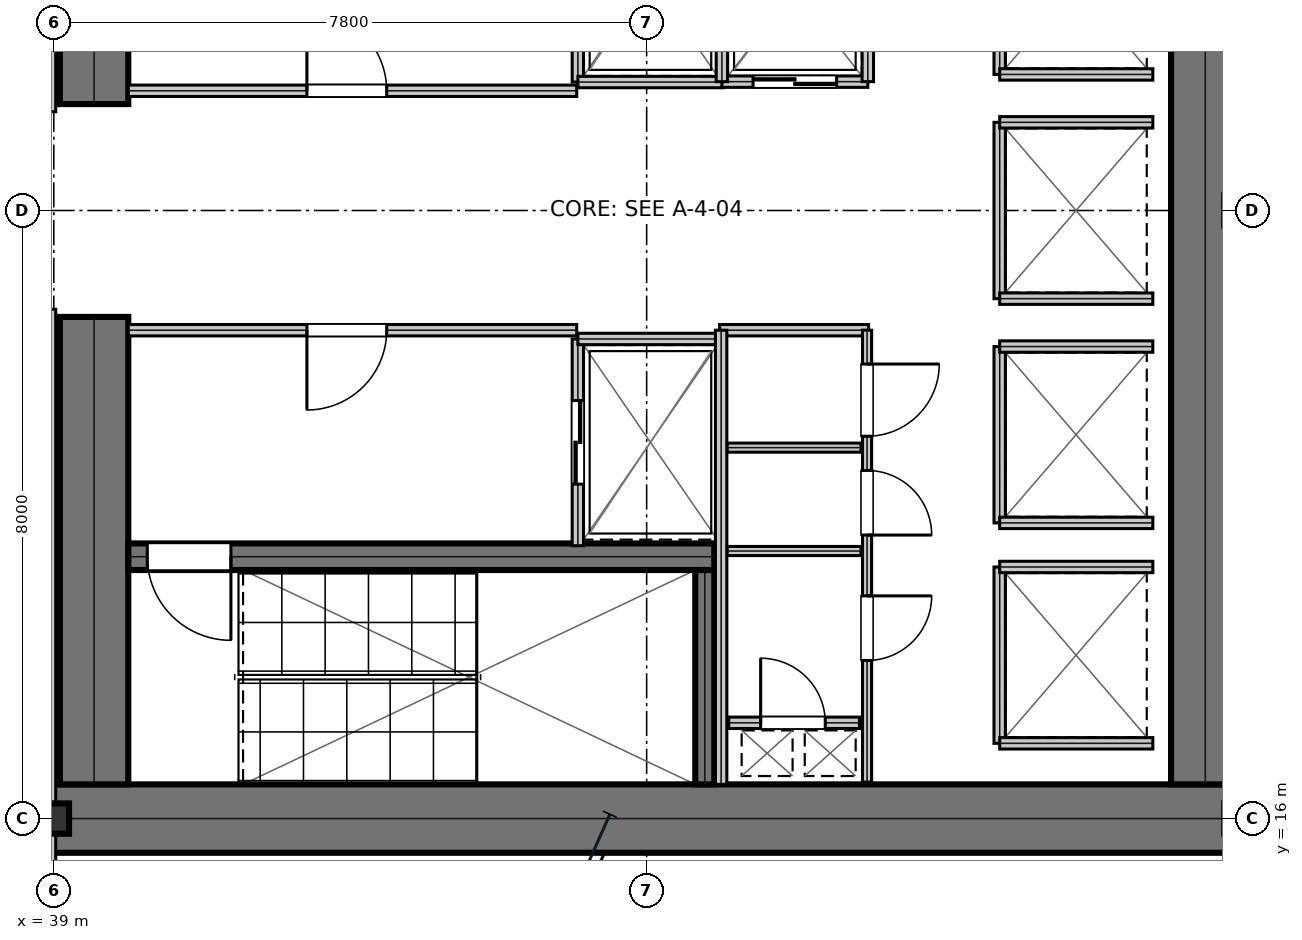
"""IFC4 building model, lengths in metres.
Left out: names, types, materials, properties, quantities, classifications, styles, units other than length and angle.
Written with IfcOpenShell. Run it as: python <this file> out.ifc"""

import sys

from ifc_helpers import new_model, si_unit, direction, frame, frame_2d, origin, origin_2d, place, context, subcontext, project, spatial, rectangle, i_section, extrude, element, fill, save


model = new_model("IFC4")
c1 = context("Model", 3, precision=1e-05, world=origin(), true_north=direction((0.0, 1.0)))
c2 = subcontext(c1, "Body", "Model", "MODEL_VIEW")
j1 = project(units=[si_unit("LENGTHUNIT", "METRE"), si_unit("PLANEANGLEUNIT", "RADIAN")], contexts=[c1])
p1 = place(None, origin())
s1 = spatial("IfcSite", under=j1, at=p1, CompositionType="ELEMENT")
p2 = place(p1, origin())
s2 = spatial("IfcBuilding", under=s1, at=p2, CompositionType="ELEMENT")
p3 = place(p2, frame((0.0, 0.0, 94.5)))
s3 = spatial("IfcBuildingStorey", under=s2, at=p3, CompositionType="ELEMENT", Elevation=94.5)
p4 = place(p3, frame((38.8, 16.0, 0.0), z_axis=(0.0, 0.0, 1.0), x_axis=(1.0, 0.0, 0.0)))
e1 = element("IfcWall", 1, at=p4, inside=s3, PredefinedType="SHEAR", context=c2, shape_type="SweptSolid", body=[
    extrude(rectangle(XDim=16.0, YDim=0.9, at=frame_2d((8.0, 0.0))), origin(), (0.0, 0.0, 1.0), 3.81),
])
for number, where, z_axis, x_axis in (
    (2, (39.53, 16.45, 0.0), (0.0, 0.0, 1.0), (0.0, 1.0, 0.0)),
    (3, (39.53, 25.4, 0.0), (0.0, 0.0, 1.0), (0.0, 1.0, 0.0)),
):
    element("IfcWall", number, at=place(p3, frame(where, z_axis=z_axis, x_axis=x_axis)), inside=s3, PredefinedType="SHEAR", context=c2, shape_type="SweptSolid", body=[
        extrude(rectangle(XDim=6.15, YDim=0.9, at=frame_2d((3.075, 0.0))), origin(), (0.0, 0.0, 1.0), 3.81),
    ])
p5 = place(p3, frame((54.15, 16.45, 0.0), z_axis=(0.0, 0.0, 1.0), x_axis=(0.0, 1.0, 0.0)))
e4 = element("IfcWall", 4, at=p5, inside=s3, PredefinedType="SHEAR", context=c2, shape_type="SweptSolid", body=[
    extrude(rectangle(XDim=15.1, YDim=0.9, at=frame_2d((7.55, 0.0))), origin(), (0.0, 0.0, 1.0), 3.81),
])
p6 = place(p3, frame((39.98, 19.445, 0.0), z_axis=(0.0, 0.0, 1.0), x_axis=(1.0, 0.0, 0.0)))
e5 = element("IfcWall", 5, at=p6, inside=s3, PredefinedType="SHEAR", context=c2, shape_type="SweptSolid", body=[
    extrude(rectangle(XDim=7.71, YDim=0.35, at=frame_2d((3.855, 0.0))), origin(), (0.0, 0.0, 1.0), 3.81),
])
p7 = place(p6, frame((0.25, 0.0, 0.0)))
e6 = element("IfcOpeningElement", 6, at=p7, cuts=e5, PredefinedType="OPENING", context=c2, shape_type="SweptSolid", body=[
    extrude(rectangle(XDim=1.1, YDim=2.15, at=frame_2d((0.55, 1.075))), frame((0.0, 0.185, 0.0), z_axis=(0.0, -1.0, 0.0), x_axis=(1.0, 0.0, 0.0)), (0.0, 0.0, 1.0), 0.37),
])
p8 = place(p3, frame((47.565, 16.45, 0.0), z_axis=(0.0, 0.0, 1.0), x_axis=(0.0, 1.0, 0.0)))
e7 = element("IfcWall", 7, at=p8, inside=s3, PredefinedType="SHEAR", context=c2, shape_type="SweptSolid", body=[
    extrude(rectangle(XDim=2.82, YDim=0.25, at=frame_2d((1.41, 0.0))), origin(), (0.0, 0.0, 1.0), 3.81),
])
p9 = place(p3, frame((39.0, 16.0, 0.0), z_axis=(0.0, 0.0, 1.0), x_axis=(1.0, 0.0, 0.0)))
e8 = element("IfcColumn", 8, at=p9, inside=s3, PredefinedType="COLUMN", context=c2, shape_type="SweptSolid", body=[
    extrude(i_section(OverallWidth=0.401, OverallDepth=0.399, WebThickness=0.025, FlangeThickness=0.04, at=origin_2d()), origin(), (0.0, 0.0, 1.0), 4.044),
])
p10 = place(p3, frame((39.98, 25.575, 0.0), z_axis=(0.0, 0.0, 1.0), x_axis=(1.0, 0.0, 0.0)))
e9 = element("IfcWall", 9, at=p10, inside=s3, PredefinedType="PARTITIONING", context=c2, shape_type="SweptSolid", body=[
    extrude(rectangle(XDim=5.9, YDim=0.15, at=frame_2d((2.95, 0.0))), origin(), (0.0, 0.0, 1.0), 3.81),
])
p11 = place(p10, frame((2.35, 0.0, 0.0)))
e10 = element("IfcOpeningElement", 10, at=p11, cuts=e9, PredefinedType="OPENING", context=c2, shape_type="SweptSolid", body=[
    extrude(rectangle(XDim=1.05, YDim=2.15, at=frame_2d((0.525, 1.075))), frame((0.0, 0.085, 0.0), z_axis=(0.0, -1.0, 0.0), x_axis=(1.0, 0.0, 0.0)), (0.0, 0.0, 1.0), 0.17),
])
p12 = place(p3, frame((39.98, 22.425, 0.0), z_axis=(0.0, 0.0, 1.0), x_axis=(1.0, 0.0, 0.0)))
e11 = element("IfcWall", 11, at=p12, inside=s3, PredefinedType="PARTITIONING", context=c2, shape_type="SweptSolid", body=[
    extrude(rectangle(XDim=5.9, YDim=0.15, at=frame_2d((2.95, 0.0))), origin(), (0.0, 0.0, 1.0), 3.81),
])
p13 = place(p12, frame((2.35, 0.0, 0.0)))
e12 = element("IfcOpeningElement", 12, at=p13, cuts=e11, PredefinedType="OPENING", context=c2, shape_type="SweptSolid", body=[
    extrude(rectangle(XDim=1.05, YDim=2.15, at=frame_2d((0.525, 1.075))), frame((0.0, 0.085, 0.0), z_axis=(0.0, -1.0, 0.0), x_axis=(1.0, 0.0, 0.0)), (0.0, 0.0, 1.0), 0.17),
])
p14 = place(p3, frame((45.895, 25.69, 0.0), z_axis=(0.0, 0.0, 1.0), x_axis=(0.0, 1.0, 0.0)))
e13 = element("IfcWall", 13, at=p14, inside=s3, PredefinedType="PARTITIONING", context=c2, shape_type="SweptSolid", body=[
    extrude(rectangle(XDim=2.72, YDim=0.15, at=frame_2d((1.36, 0.0))), origin(), (0.0, 0.0, 1.0), 3.81),
])
p15 = place(p14, frame((0.81, 0.0, 0.0)))
e14 = element("IfcOpeningElement", 14, at=p15, cuts=e13, PredefinedType="OPENING", context=c2, shape_type="SweptSolid", body=[
    extrude(rectangle(XDim=1.1, YDim=2.15, at=frame_2d((0.55, 1.075))), frame((0.0, 0.085, 0.0), z_axis=(0.0, -1.0, 0.0), x_axis=(1.0, 0.0, 0.0)), (0.0, 0.0, 1.0), 0.17),
])
p16 = place(p3, frame((45.895, 25.69, 0.0), z_axis=(0.0, 0.0, 1.0), x_axis=(1.0, 0.0, 0.0)))
e15 = element("IfcWall", 15, at=p16, inside=s3, PredefinedType="PARTITIONING", context=c2, shape_type="SweptSolid", body=[
    extrude(rectangle(XDim=1.915, YDim=0.15, at=frame_2d((0.958, 0.0))), origin(), (0.0, 0.0, 1.0), 3.81),
])
p17 = place(p3, frame((45.895, 19.59, 0.0), z_axis=(0.0, 0.0, 1.0), x_axis=(0.0, 1.0, 0.0)))
e16 = element("IfcWall", 16, at=p17, inside=s3, PredefinedType="PARTITIONING", context=c2, shape_type="SweptSolid", body=[
    extrude(rectangle(XDim=2.72, YDim=0.15, at=frame_2d((1.36, 0.0))), origin(), (0.0, 0.0, 1.0), 3.81),
])
p18 = place(p17, frame((0.81, 0.0, 0.0)))
e17 = element("IfcOpeningElement", 17, at=p18, cuts=e16, PredefinedType="OPENING", context=c2, shape_type="SweptSolid", body=[
    extrude(rectangle(XDim=1.1, YDim=2.15, at=frame_2d((0.55, 1.075))), frame((0.0, 0.085, 0.0), z_axis=(0.0, -1.0, 0.0), x_axis=(1.0, 0.0, 0.0)), (0.0, 0.0, 1.0), 0.17),
])
p19 = place(p3, frame((45.895, 22.31, 0.0), z_axis=(0.0, 0.0, 1.0), x_axis=(1.0, 0.0, 0.0)))
e18 = element("IfcWall", 18, at=p19, inside=s3, PredefinedType="PARTITIONING", context=c2, shape_type="SweptSolid", body=[
    extrude(rectangle(XDim=1.915, YDim=0.15, at=frame_2d((0.958, 0.0))), origin(), (0.0, 0.0, 1.0), 3.81),
])
p20 = place(p3, frame((47.79, 25.695, 0.0), z_axis=(0.0, 0.0, 1.0), x_axis=(1.0, 0.0, 0.0)))
e19 = element("IfcWall", 19, at=p20, inside=s3, PredefinedType="PARTITIONING", context=c2, shape_type="SweptSolid", body=[
    extrude(rectangle(XDim=1.92, YDim=0.15, at=frame_2d((0.96, 0.0))), origin(), (0.0, 0.0, 1.0), 3.81),
])
p21 = place(p20, frame((0.41, 0.0, 0.0)))
e20 = element("IfcOpeningElement", 20, at=p21, cuts=e19, PredefinedType="OPENING", context=c2, shape_type="SweptSolid", body=[
    extrude(rectangle(XDim=1.1, YDim=2.15, at=frame_2d((0.55, 1.075))), frame((0.0, 0.085, 0.0), z_axis=(0.0, -1.0, 0.0), x_axis=(1.0, 0.0, 0.0)), (0.0, 0.0, 1.0), 0.17),
])
for number, where, z_axis, x_axis in (
    (21, (47.79, 25.695, 0.0), (0.0, 0.0, 1.0), (0.0, 1.0, 0.0)),
    (22, (49.71, 25.695, 0.0), (0.0, 0.0, 1.0), (0.0, 1.0, 0.0)),
):
    element("IfcWall", number, at=place(p3, frame(where, z_axis=z_axis, x_axis=x_axis)), inside=s3, PredefinedType="PARTITIONING", context=c2, shape_type="SweptSolid", body=[
        extrude(rectangle(XDim=2.415, YDim=0.15, at=frame_2d((1.208, 0.0))), origin(), (0.0, 0.0, 1.0), 3.81),
    ])
p22 = place(p3, frame((51.445, 25.79, 0.0), z_axis=(0.0, 0.0, 1.0), x_axis=(0.0, 1.0, 0.0)))
e23 = element("IfcWall", 23, at=p22, inside=s3, PredefinedType="PARTITIONING", context=c2, shape_type="SweptSolid", body=[
    extrude(rectangle(XDim=2.32, YDim=0.15, at=frame_2d((1.16, 0.0))), origin(), (0.0, 0.0, 1.0), 3.81),
])
p23 = place(p3, frame((51.445, 25.79, 0.0), z_axis=(0.0, 0.0, 1.0), x_axis=(1.0, 0.0, 0.0)))
e24 = element("IfcWall", 24, at=p23, inside=s3, PredefinedType="PARTITIONING", context=c2, shape_type="SweptSolid", body=[
    extrude(rectangle(XDim=2.015, YDim=0.15, at=frame_2d((1.007, 0.0))), origin(), (0.0, 0.0, 1.0), 3.81),
])
p24 = place(p3, frame((51.445, 19.89, 0.0), z_axis=(0.0, 0.0, 1.0), x_axis=(0.0, 1.0, 0.0)))
e25 = element("IfcWall", 25, at=p24, inside=s3, PredefinedType="PARTITIONING", context=c2, shape_type="SweptSolid", body=[
    extrude(rectangle(XDim=2.32, YDim=0.15, at=frame_2d((1.16, 0.0))), origin(), (0.0, 0.0, 1.0), 3.81),
])
for number, where, z_axis, x_axis in (
    (26, (51.445, 19.89, 0.0), (0.0, 0.0, 1.0), (1.0, 0.0, 0.0)),
    (27, (51.445, 22.21, 0.0), (0.0, 0.0, 1.0), (1.0, 0.0, 0.0)),
):
    element("IfcWall", number, at=place(p3, frame(where, z_axis=z_axis, x_axis=x_axis)), inside=s3, PredefinedType="PARTITIONING", context=c2, shape_type="SweptSolid", body=[
        extrude(rectangle(XDim=2.015, YDim=0.15, at=frame_2d((1.007, 0.0))), origin(), (0.0, 0.0, 1.0), 3.81),
    ])
p25 = place(p3, frame((51.445, 22.84, 0.0), z_axis=(0.0, 0.0, 1.0), x_axis=(0.0, 1.0, 0.0)))
e28 = element("IfcWall", 28, at=p25, inside=s3, PredefinedType="PARTITIONING", context=c2, shape_type="SweptSolid", body=[
    extrude(rectangle(XDim=2.32, YDim=0.15, at=frame_2d((1.16, 0.0))), origin(), (0.0, 0.0, 1.0), 3.81),
])
for number, where, z_axis, x_axis in (
    (29, (51.445, 22.84, 0.0), (0.0, 0.0, 1.0), (1.0, 0.0, 0.0)),
    (30, (51.445, 25.16, 0.0), (0.0, 0.0, 1.0), (1.0, 0.0, 0.0)),
):
    element("IfcWall", number, at=place(p3, frame(where, z_axis=z_axis, x_axis=x_axis)), inside=s3, PredefinedType="PARTITIONING", context=c2, shape_type="SweptSolid", body=[
        extrude(rectangle(XDim=2.015, YDim=0.15, at=frame_2d((1.007, 0.0))), origin(), (0.0, 0.0, 1.0), 3.81),
    ])
p26 = place(p3, frame((51.445, 16.99, 0.0), z_axis=(0.0, 0.0, 1.0), x_axis=(0.0, 1.0, 0.0)))
e31 = element("IfcWall", 31, at=p26, inside=s3, PredefinedType="PARTITIONING", context=c2, shape_type="SweptSolid", body=[
    extrude(rectangle(XDim=2.32, YDim=0.15, at=frame_2d((1.16, 0.0))), origin(), (0.0, 0.0, 1.0), 3.81),
])
for number, where, z_axis, x_axis in (
    (32, (51.445, 16.99, 0.0), (0.0, 0.0, 1.0), (1.0, 0.0, 0.0)),
    (33, (51.445, 19.31, 0.0), (0.0, 0.0, 1.0), (1.0, 0.0, 0.0)),
):
    element("IfcWall", number, at=place(p3, frame(where, z_axis=z_axis, x_axis=x_axis)), inside=s3, PredefinedType="PARTITIONING", context=c2, shape_type="SweptSolid", body=[
        extrude(rectangle(XDim=2.015, YDim=0.15, at=frame_2d((1.007, 0.0))), origin(), (0.0, 0.0, 1.0), 3.81),
    ])
p27 = place(p3, frame((47.88, 17.26, 0.0), z_axis=(0.0, 0.0, 1.0), x_axis=(1.0, 0.0, 0.0)))
e34 = element("IfcWall", 34, at=p27, inside=s3, PredefinedType="PARTITIONING", context=c2, shape_type="SweptSolid", body=[
    extrude(rectangle(XDim=1.72, YDim=0.15, at=frame_2d((0.86, 0.0))), origin(), (0.0, 0.0, 1.0), 3.81),
])
p28 = place(p27, frame((0.42, 0.0, 0.0)))
e35 = element("IfcOpeningElement", 35, at=p28, cuts=e34, PredefinedType="OPENING", context=c2, shape_type="SweptSolid", body=[
    extrude(rectangle(XDim=0.85, YDim=2.15, at=frame_2d((0.425, 1.075))), frame((0.0, 0.085, 0.0), z_axis=(0.0, -1.0, 0.0), x_axis=(1.0, 0.0, 0.0)), (0.0, 0.0, 1.0), 0.17),
])
p29 = place(p3, frame((47.76, 22.425, 0.0), z_axis=(0.0, 0.0, 1.0), x_axis=(1.0, 0.0, 0.0)))
e36 = element("IfcWall", 36, at=p29, inside=s3, PredefinedType="PARTITIONING", context=c2, shape_type="SweptSolid", body=[
    extrude(rectangle(XDim=1.96, YDim=0.15, at=frame_2d((0.98, 0.0))), origin(), (0.0, 0.0, 1.0), 3.81),
])
p30 = place(p3, frame((47.78, 16.45, 0.0), z_axis=(0.0, 0.0, 1.0), x_axis=(0.0, 1.0, 0.0)))
e37 = element("IfcWall", 37, at=p30, inside=s3, PredefinedType="PARTITIONING", context=c2, shape_type="SweptSolid", body=[
    extrude(rectangle(XDim=5.975, YDim=0.15, at=frame_2d((2.988, 0.0))), origin(), (0.0, 0.0, 1.0), 3.81),
])
for number, where, z_axis, x_axis in (
    (38, (47.86, 19.52, 0.0), (0.0, 0.0, 1.0), (1.0, 0.0, 0.0)),
    (39, (47.86, 20.88, 0.0), (0.0, 0.0, 1.0), (1.0, 0.0, 0.0)),
):
    element("IfcWall", number, at=place(p3, frame(where, z_axis=z_axis, x_axis=x_axis)), inside=s3, PredefinedType="PARTITIONING", context=c2, shape_type="SweptSolid", body=[
        extrude(rectangle(XDim=1.76, YDim=0.12, at=frame_2d((0.88, 0.0))), origin(), (0.0, 0.0, 1.0), 3.81),
    ])
p31 = place(p3, frame((49.7, 16.48, 0.0), z_axis=(0.0, 0.0, 1.0), x_axis=(0.0, 1.0, 0.0)))
e40 = element("IfcWall", 40, at=p31, inside=s3, PredefinedType="PARTITIONING", context=c2, shape_type="SweptSolid", body=[
    extrude(rectangle(XDim=5.945, YDim=0.12, at=frame_2d((2.973, 0.0))), origin(), (0.0, 0.0, 1.0), 3.81),
])
p32 = place(p31, frame((1.6, 0.0, 0.0)))
e41 = element("IfcOpeningElement", 41, at=p32, cuts=e40, PredefinedType="OPENING", context=c2, shape_type="SweptSolid", body=[
    extrude(rectangle(XDim=0.85, YDim=2.15, at=frame_2d((0.425, 1.075))), frame((0.0, 0.07, 0.0), z_axis=(0.0, -1.0, 0.0), x_axis=(1.0, 0.0, 0.0)), (0.0, 0.0, 1.0), 0.14),
])
p33 = place(p31, frame((3.25, 0.0, 0.0)))
e42 = element("IfcOpeningElement", 42, at=p33, cuts=e40, PredefinedType="OPENING", context=c2, shape_type="SweptSolid", body=[
    extrude(rectangle(XDim=0.85, YDim=2.15, at=frame_2d((0.425, 1.075))), frame((0.0, 0.07, 0.0), z_axis=(0.0, -1.0, 0.0), x_axis=(1.0, 0.0, 0.0)), (0.0, 0.0, 1.0), 0.14),
])
p34 = place(p31, frame((4.55, 0.0, 0.0)))
e43 = element("IfcOpeningElement", 43, at=p34, cuts=e40, PredefinedType="OPENING", context=c2, shape_type="SweptSolid", body=[
    extrude(rectangle(XDim=0.95, YDim=2.15, at=frame_2d((0.475, 1.075))), frame((0.0, 0.07, 0.0), z_axis=(0.0, -1.0, 0.0), x_axis=(1.0, 0.0, 0.0)), (0.0, 0.0, 1.0), 0.14),
])
for number, where, z_axis, x_axis in (
    (44, (38.95, 14.5, 0.0), (0.0, 0.0, 1.0), (0.0, 1.0, 0.0)),
    (45, (38.95, 25.3, 0.0), (0.0, 0.0, 1.0), (0.0, 1.0, 0.0)),
):
    element("IfcWall", number, at=place(p3, frame(where, z_axis=z_axis, x_axis=x_axis)), inside=s3, PredefinedType="PARTITIONING", context=c2, shape_type="SweptSolid", body=[
        extrude(rectangle(XDim=8.2, YDim=0.15, at=frame_2d((4.1, 0.0))), origin(), (0.0, 0.0, 1.0), 3.181),
    ])
p35 = place(p11, origin())
e46 = element("IfcDoor", 46, at=p35, inside=s3, OperationType="SINGLE_SWING_LEFT", PredefinedType="DOOR", context=c2, shape_type="SweptSolid", body=[
    extrude(rectangle(XDim=1.05, YDim=2.15, at=frame_2d((0.525, 1.075))), frame((0.0, 0.025, 0.0), z_axis=(0.0, -1.0, 0.0), x_axis=(1.0, 0.0, 0.0)), (0.0, 0.0, 1.0), 0.05),
])
fill(e10, e46)
p36 = place(p13, frame((1.05, 0.0, 0.0), z_axis=(0.0, 0.0, 1.0), x_axis=(-1.0, 0.0, 0.0)))
e47 = element("IfcDoor", 47, at=p36, inside=s3, OperationType="SINGLE_SWING_RIGHT", PredefinedType="DOOR", context=c2, shape_type="SweptSolid", body=[
    extrude(rectangle(XDim=1.05, YDim=2.15, at=frame_2d((0.525, 1.075))), frame((0.0, 0.025, 0.0), z_axis=(0.0, -1.0, 0.0), x_axis=(1.0, 0.0, 0.0)), (0.0, 0.0, 1.0), 0.05),
])
fill(e12, e47)
p37 = place(p18, frame((1.1, 0.0, 0.0), z_axis=(0.0, 0.0, 1.0), x_axis=(-1.0, 0.0, 0.0)))
e48 = element("IfcDoor", 48, at=p37, inside=s3, OperationType="DOUBLE_DOOR_SLIDING", PredefinedType="DOOR", context=c2, shape_type="SweptSolid", body=[
    extrude(rectangle(XDim=1.1, YDim=2.15, at=frame_2d((0.55, 1.075))), frame((0.0, 0.025, 0.0), z_axis=(0.0, -1.0, 0.0), x_axis=(1.0, 0.0, 0.0)), (0.0, 0.0, 1.0), 0.05),
])
fill(e17, e48)
p38 = place(p21, frame((1.1, 0.0, 0.0), z_axis=(0.0, 0.0, 1.0), x_axis=(-1.0, 0.0, 0.0)))
e49 = element("IfcDoor", 49, at=p38, inside=s3, OperationType="DOUBLE_DOOR_SLIDING", PredefinedType="DOOR", context=c2, shape_type="SweptSolid", body=[
    extrude(rectangle(XDim=1.1, YDim=2.15, at=frame_2d((0.55, 1.075))), frame((0.0, 0.025, 0.0), z_axis=(0.0, -1.0, 0.0), x_axis=(1.0, 0.0, 0.0)), (0.0, 0.0, 1.0), 0.05),
])
fill(e20, e49)
p39 = place(p28, origin())
e50 = element("IfcDoor", 50, at=p39, inside=s3, OperationType="SINGLE_SWING_LEFT", PredefinedType="TRAPDOOR", context=c2, shape_type="SweptSolid", body=[
    extrude(rectangle(XDim=0.85, YDim=2.15, at=frame_2d((0.425, 1.075))), frame((0.0, 0.025, 0.0), z_axis=(0.0, -1.0, 0.0), x_axis=(1.0, 0.0, 0.0)), (0.0, 0.0, 1.0), 0.05),
])
fill(e35, e50)
p40 = place(p32, frame((0.85, 0.0, 0.0), z_axis=(0.0, 0.0, 1.0), x_axis=(-1.0, 0.0, 0.0)))
e51 = element("IfcDoor", 51, at=p40, inside=s3, OperationType="SINGLE_SWING_LEFT", PredefinedType="DOOR", context=c2, shape_type="SweptSolid", body=[
    extrude(rectangle(XDim=0.85, YDim=2.15, at=frame_2d((0.425, 1.075))), frame((0.0, 0.025, 0.0), z_axis=(0.0, -1.0, 0.0), x_axis=(1.0, 0.0, 0.0)), (0.0, 0.0, 1.0), 0.05),
])
fill(e41, e51)
p41 = place(p33, frame((0.85, 0.0, 0.0), z_axis=(0.0, 0.0, 1.0), x_axis=(-1.0, 0.0, 0.0)))
e52 = element("IfcDoor", 52, at=p41, inside=s3, OperationType="SINGLE_SWING_RIGHT", PredefinedType="DOOR", context=c2, shape_type="SweptSolid", body=[
    extrude(rectangle(XDim=0.85, YDim=2.15, at=frame_2d((0.425, 1.075))), frame((0.0, 0.025, 0.0), z_axis=(0.0, -1.0, 0.0), x_axis=(1.0, 0.0, 0.0)), (0.0, 0.0, 1.0), 0.05),
])
fill(e42, e52)
p42 = place(p34, frame((0.95, 0.0, 0.0), z_axis=(0.0, 0.0, 1.0), x_axis=(-1.0, 0.0, 0.0)))
e53 = element("IfcDoor", 53, at=p42, inside=s3, OperationType="SINGLE_SWING_LEFT", PredefinedType="DOOR", context=c2, shape_type="SweptSolid", body=[
    extrude(rectangle(XDim=0.95, YDim=2.15, at=frame_2d((0.475, 1.075))), frame((0.0, 0.025, 0.0), z_axis=(0.0, -1.0, 0.0), x_axis=(1.0, 0.0, 0.0)), (0.0, 0.0, 1.0), 0.05),
])
fill(e43, e53)
p43 = place(p7, frame((1.1, 0.0, 0.0), z_axis=(0.0, 0.0, 1.0), x_axis=(-1.0, 0.0, 0.0)))
e54 = element("IfcDoor", 54, at=p43, inside=s3, OperationType="SINGLE_SWING_LEFT", PredefinedType="DOOR", context=c2, shape_type="SweptSolid", body=[
    extrude(rectangle(XDim=1.1, YDim=2.15, at=frame_2d((0.55, 1.075))), frame((0.0, 0.025, 0.0), z_axis=(0.0, -1.0, 0.0), x_axis=(1.0, 0.0, 0.0)), (0.0, 0.0, 1.0), 0.05),
])
fill(e6, e54)
save(model, sys.argv[1])
